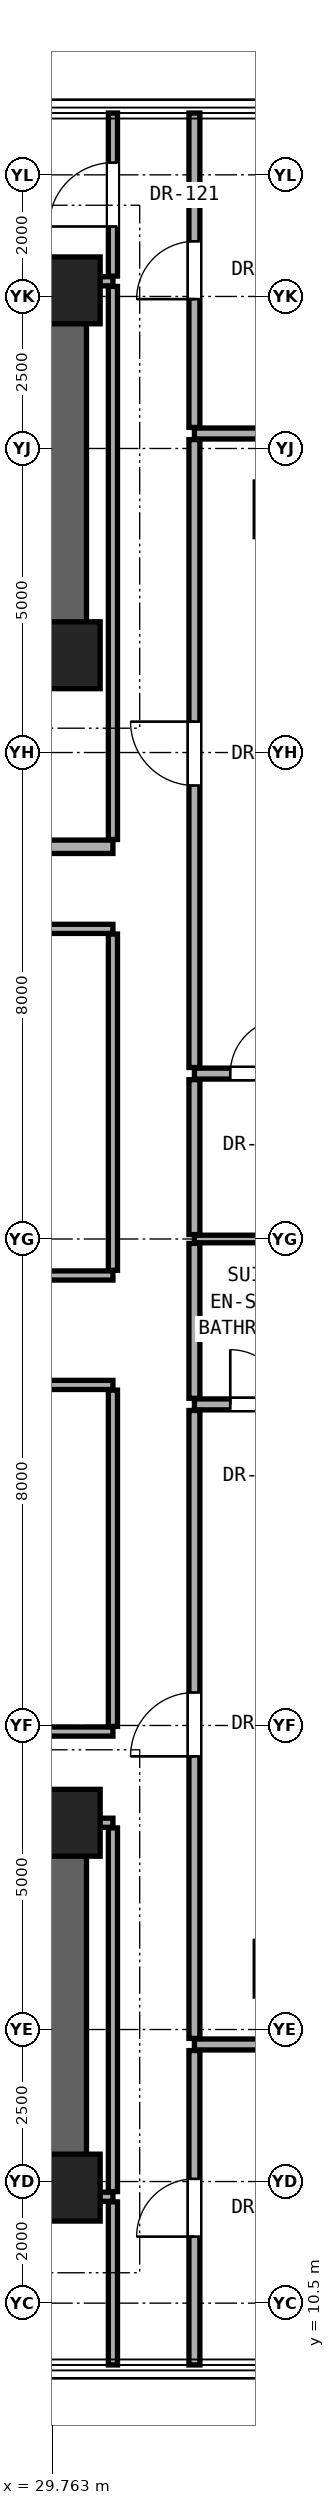
"""IFC4 building model, lengths in metres.
Left out: names, types, materials, properties, quantities, classifications, styles, units other than length and angle.
Written with IfcOpenShell. Run it as: python <this file> out.ifc"""

import sys

from ifc_helpers import new_model, si_unit, direction, frame, frame_2d, origin, origin_2d, place, context, subcontext, project, spatial, rectangle, extrude, element, fill, save


model = new_model("IFC4")
c1 = context("Model", 3, precision=1e-05, world=origin(), true_north=direction((0.0, 1.0)))
c2 = subcontext(c1, "Body", "Model", "MODEL_VIEW")
j1 = project(units=[si_unit("LENGTHUNIT", "METRE"), si_unit("PLANEANGLEUNIT", "RADIAN")], contexts=[c1])
p1 = place(None, origin())
s1 = spatial("IfcSite", under=j1, at=p1, CompositionType="ELEMENT")
p2 = place(p1, origin())
s2 = spatial("IfcBuilding", under=s1, at=p2, CompositionType="ELEMENT")
p3 = place(p2, frame((0.0, 0.0, 124.7)))
s3 = spatial("IfcBuildingStorey", under=s2, at=p3, CompositionType="ELEMENT", Elevation=124.7)
for number, where, z_axis, x_axis in (
    (1, (30.0, 12.4, 0.0), (0.0, 0.0, 1.0), (1.0, 0.0, 0.0)),
    (2, (30.0, 18.4, 0.0), (0.0, 0.0, 1.0), (1.0, 0.0, 0.0)),
    (3, (30.0, 37.6, 0.0), (0.0, 0.0, 1.0), (1.0, 0.0, 0.0)),
    (4, (30.0, 43.6, 0.0), (0.0, 0.0, 1.0), (1.0, 0.0, 0.0)),
):
    element("IfcColumn", number, at=place(p3, frame(where, z_axis=z_axis, x_axis=x_axis)), inside=s3, PredefinedType="COLUMN", context=c2, shape_type="SweptSolid", body=[
        extrude(rectangle(XDim=1.1, YDim=1.1, at=origin_2d()), origin(), (0.0, 0.0, 1.0), 3.3),
    ])
for number, where, z_axis, x_axis in (
    (5, (33.4, 16.0, 0.0), (0.0, 0.0, 1.0), (1.0, 0.0, 0.0)),
    (6, (33.4, 40.0, 0.0), (0.0, 0.0, 1.0), (1.0, 0.0, 0.0)),
):
    element("IfcColumn", number, at=place(p3, frame(where, z_axis=z_axis, x_axis=x_axis)), inside=s3, PredefinedType="PILASTER", context=c2, shape_type="SweptSolid", body=[
        extrude(rectangle(XDim=0.6, YDim=0.9, at=origin_2d()), origin(), (0.0, 0.0, 1.0), 3.3),
    ])
p4 = place(p3, frame((11.0, 43.6, 0.0), z_axis=(0.0, 0.0, 1.0), x_axis=(1.0, 0.0, 0.0)))
e7 = element("IfcWall", 7, at=p4, inside=s3, PredefinedType="SHEAR", context=c2, shape_type="SweptSolid", body=[
    extrude(rectangle(XDim=19.0, YDim=0.65, at=frame_2d((9.5, 0.0))), origin(), (0.0, 0.0, 1.0), 3.08),
])
p5 = place(p3, frame((30.0, 37.6, 0.0), z_axis=(0.0, 0.0, 1.0), x_axis=(0.0, 1.0, 0.0)))
e8 = element("IfcWall", 8, at=p5, inside=s3, PredefinedType="SHEAR", context=c2, shape_type="SweptSolid", body=[
    extrude(rectangle(XDim=6.0, YDim=0.65, at=frame_2d((3.0, 0.0))), origin(), (0.0, 0.0, 1.0), 3.08),
])
p6 = place(p3, frame((11.0, 37.6, 0.0), z_axis=(0.0, 0.0, 1.0), x_axis=(1.0, 0.0, 0.0)))
e9 = element("IfcWall", 9, at=p6, inside=s3, PredefinedType="SHEAR", context=c2, shape_type="SweptSolid", body=[
    extrude(rectangle(XDim=19.0, YDim=0.65, at=frame_2d((9.5, 0.0))), origin(), (0.0, 0.0, 1.0), 3.08),
])
p7 = place(p6, frame((1.06, 0.0, 0.0)))
e10 = element("IfcOpeningElement", 10, at=p7, cuts=e9, PredefinedType="OPENING", context=c2, shape_type="SweptSolid", body=[
    extrude(rectangle(XDim=1.15, YDim=2.2, at=frame_2d((0.575, 1.1))), frame((0.0, 0.335, 0.0), z_axis=(0.0, -1.0, 0.0), x_axis=(1.0, 0.0, 0.0)), (0.0, 0.0, 1.0), 0.67),
])
p8 = place(p6, frame((9.55, 0.0, 0.0)))
e11 = element("IfcOpeningElement", 11, at=p8, cuts=e9, PredefinedType="OPENING", context=c2, shape_type="SweptSolid", body=[
    extrude(rectangle(XDim=1.4, YDim=2.35, at=frame_2d((0.7, 1.175))), frame((0.0, 0.335, 0.0), z_axis=(0.0, -1.0, 0.0), x_axis=(1.0, 0.0, 0.0)), (0.0, 0.0, 1.0), 0.67),
])
p9 = place(p6, frame((11.95, 0.0, 0.0)))
e12 = element("IfcOpeningElement", 12, at=p9, cuts=e9, PredefinedType="OPENING", context=c2, shape_type="SweptSolid", body=[
    extrude(rectangle(XDim=1.4, YDim=2.35, at=frame_2d((0.7, 1.175))), frame((0.0, 0.335, 0.0), z_axis=(0.0, -1.0, 0.0), x_axis=(1.0, 0.0, 0.0)), (0.0, 0.0, 1.0), 0.67),
])
p10 = place(p3, frame((11.0, 12.4, 0.0), z_axis=(0.0, 0.0, 1.0), x_axis=(1.0, 0.0, 0.0)))
e13 = element("IfcWall", 13, at=p10, inside=s3, PredefinedType="SHEAR", context=c2, shape_type="SweptSolid", body=[
    extrude(rectangle(XDim=19.0, YDim=0.65, at=frame_2d((9.5, 0.0))), origin(), (0.0, 0.0, 1.0), 3.08),
])
p11 = place(p3, frame((30.0, 12.4, 0.0), z_axis=(0.0, 0.0, 1.0), x_axis=(0.0, 1.0, 0.0)))
e14 = element("IfcWall", 14, at=p11, inside=s3, PredefinedType="SHEAR", context=c2, shape_type="SweptSolid", body=[
    extrude(rectangle(XDim=6.0, YDim=0.65, at=frame_2d((3.0, 0.0))), origin(), (0.0, 0.0, 1.0), 3.08),
])
p12 = place(p3, frame((11.0, 18.4, 0.0), z_axis=(0.0, 0.0, 1.0), x_axis=(1.0, 0.0, 0.0)))
e15 = element("IfcWall", 15, at=p12, inside=s3, PredefinedType="SHEAR", context=c2, shape_type="SweptSolid", body=[
    extrude(rectangle(XDim=19.0, YDim=0.65, at=frame_2d((9.5, 0.0))), origin(), (0.0, 0.0, 1.0), 3.08),
])
p13 = place(p12, frame((4.175, 0.0, 0.0)))
e16 = element("IfcOpeningElement", 16, at=p13, cuts=e15, PredefinedType="OPENING", context=c2, shape_type="SweptSolid", body=[
    extrude(rectangle(XDim=1.2, YDim=2.25, at=frame_2d((0.6, 1.125))), frame((0.0, 0.335, 0.0), z_axis=(0.0, -1.0, 0.0), x_axis=(1.0, 0.0, 0.0)), (0.0, 0.0, 1.0), 0.67),
])
p14 = place(p12, frame((9.6, 0.0, 0.0)))
e17 = element("IfcOpeningElement", 17, at=p14, cuts=e15, PredefinedType="OPENING", context=c2, shape_type="SweptSolid", body=[
    extrude(rectangle(XDim=1.3, YDim=2.3, at=frame_2d((0.65, 1.15))), frame((0.0, 0.335, 0.0), z_axis=(0.0, -1.0, 0.0), x_axis=(1.0, 0.0, 0.0)), (0.0, 0.0, 1.0), 0.67),
])
p15 = place(p12, frame((11.9, 0.0, 0.0)))
e18 = element("IfcOpeningElement", 18, at=p15, cuts=e15, PredefinedType="OPENING", context=c2, shape_type="SweptSolid", body=[
    extrude(rectangle(XDim=1.3, YDim=2.3, at=frame_2d((0.65, 1.15))), frame((0.0, 0.335, 0.0), z_axis=(0.0, -1.0, 0.0), x_axis=(1.0, 0.0, 0.0)), (0.0, 0.0, 1.0), 0.67),
])
p16 = place(p12, frame((14.3, 0.0, 0.0)))
e19 = element("IfcOpeningElement", 19, at=p16, cuts=e15, PredefinedType="OPENING", context=c2, shape_type="SweptSolid", body=[
    extrude(rectangle(XDim=1.3, YDim=2.3, at=frame_2d((0.65, 1.15))), frame((0.0, 0.335, 0.0), z_axis=(0.0, -1.0, 0.0), x_axis=(1.0, 0.0, 0.0)), (0.0, 0.0, 1.0), 0.67),
])
p17 = place(p12, frame((16.6, 0.0, 0.0)))
e20 = element("IfcOpeningElement", 20, at=p17, cuts=e15, PredefinedType="OPENING", context=c2, shape_type="SweptSolid", body=[
    extrude(rectangle(XDim=1.3, YDim=2.3, at=frame_2d((0.65, 1.15))), frame((0.0, 0.335, 0.0), z_axis=(0.0, -1.0, 0.0), x_axis=(1.0, 0.0, 0.0)), (0.0, 0.0, 1.0), 0.67),
])
p18 = place(p3, frame((30.32, 12.25, 0.0), z_axis=(0.0, 0.0, 1.0), x_axis=(1.0, 0.0, 0.0)))
e21 = element("IfcWall", 21, at=p18, inside=s3, PredefinedType="PARTITIONING", context=c2, shape_type="SweptSolid", body=[
    extrude(rectangle(XDim=0.44, YDim=0.15, at=frame_2d((0.22, 0.0))), origin(), (0.0, 0.0, 1.0), 3.08),
])
p19 = place(p3, frame((32.1, 14.754, 0.0), z_axis=(0.0, 0.0, 1.0), x_axis=(1.0, 0.0, 0.0)))
e22 = element("IfcWall", 22, at=p19, inside=s3, PredefinedType="PARTITIONING", context=c2, shape_type="SweptSolid", body=[
    extrude(rectangle(XDim=3.55, YDim=0.18, at=frame_2d((1.775, 0.0))), origin(), (0.0, 0.0, 1.0), 3.08),
])
p20 = place(p3, frame((30.32, 18.4, 0.0), z_axis=(0.0, 0.0, 1.0), x_axis=(1.0, 0.0, 0.0)))
e23 = element("IfcWall", 23, at=p20, inside=s3, PredefinedType="PARTITIONING", context=c2, shape_type="SweptSolid", body=[
    extrude(rectangle(XDim=0.44, YDim=0.15, at=frame_2d((0.22, 0.0))), origin(), (0.0, 0.0, 1.0), 2.456),
])
p21 = place(p3, frame((21.44, 19.9, 0.0), z_axis=(0.0, 0.0, 1.0), x_axis=(1.0, 0.0, 0.0)))
e24 = element("IfcWall", 24, at=p21, inside=s3, PredefinedType="PARTITIONING", context=c2, shape_type="SweptSolid", body=[
    extrude(rectangle(XDim=9.32, YDim=0.15, at=frame_2d((4.66, 0.0))), origin(), (0.0, 0.0, 1.0), 2.216),
])
p22 = place(p21, frame((4.185, 0.0, 0.0)))
e25 = element("IfcOpeningElement", 25, at=p22, cuts=e24, PredefinedType="OPENING", context=c2, shape_type="SweptSolid", body=[
    extrude(rectangle(XDim=0.95, YDim=2.15, at=frame_2d((0.475, 1.075))), frame((0.0, 0.085, 0.0), z_axis=(0.0, -1.0, 0.0), x_axis=(1.0, 0.0, 0.0)), (0.0, 0.0, 1.0), 0.17),
])
p23 = place(p3, frame((32.1, 25.28, 0.0), z_axis=(0.0, 0.0, 1.0), x_axis=(1.0, 0.0, 0.0)))
e26 = element("IfcWall", 26, at=p23, inside=s3, PredefinedType="PARTITIONING", context=c2, shape_type="SweptSolid", body=[
    extrude(rectangle(XDim=8.84, YDim=0.18, at=frame_2d((4.42, 0.0))), origin(), (0.0, 0.0, 1.0), 2.299),
])
p24 = place(p23, frame((4.945, 0.0, 0.0)))
e27 = element("IfcOpeningElement", 27, at=p24, cuts=e26, PredefinedType="OPENING", context=c2, shape_type="SweptSolid", body=[
    extrude(rectangle(XDim=0.95, YDim=2.15, at=frame_2d((0.475, 1.075))), frame((0.0, 0.1, 0.0), z_axis=(0.0, -1.0, 0.0), x_axis=(1.0, 0.0, 0.0)), (0.0, 0.0, 1.0), 0.2),
])
p25 = place(p23, frame((0.59, 0.0, 0.0)))
e28 = element("IfcOpeningElement", 28, at=p25, cuts=e26, PredefinedType="OPENING", context=c2, shape_type="SweptSolid", body=[
    extrude(rectangle(XDim=0.9, YDim=2.1, at=frame_2d((0.45, 1.05))), frame((0.0, 0.1, 0.0), z_axis=(0.0, -1.0, 0.0), x_axis=(1.0, 0.0, 0.0)), (0.0, 0.0, 1.0), 0.2),
])
for number, where, z_axis, x_axis in (
    (29, (21.4, 25.6, 0.0), (0.0, 0.0, 1.0), (1.0, 0.0, 0.0)),
    (30, (21.4, 27.4, 0.0), (0.0, 0.0, 1.0), (1.0, 0.0, 0.0)),
):
    element("IfcWall", number, at=place(p3, frame(where, z_axis=z_axis, x_axis=x_axis)), inside=s3, PredefinedType="PARTITIONING", context=c2, shape_type="SweptSolid", body=[
        extrude(rectangle(XDim=9.36, YDim=0.15, at=frame_2d((4.68, 0.0))), origin(), (0.0, 0.0, 1.0), 2.216),
    ])
p26 = place(p3, frame((32.1, 28.0, 0.0), z_axis=(0.0, 0.0, 1.0), x_axis=(1.0, 0.0, 0.0)))
e31 = element("IfcWall", 31, at=p26, inside=s3, PredefinedType="PARTITIONING", context=c2, shape_type="SweptSolid", body=[
    extrude(rectangle(XDim=8.84, YDim=0.125, at=frame_2d((4.42, 0.0))), origin(), (0.0, 0.0, 1.0), 2.299),
])
p27 = place(p3, frame((32.1, 30.72, 0.0), z_axis=(0.0, 0.0, 1.0), x_axis=(1.0, 0.0, 0.0)))
e32 = element("IfcWall", 32, at=p27, inside=s3, PredefinedType="PARTITIONING", context=c2, shape_type="SweptSolid", body=[
    extrude(rectangle(XDim=8.84, YDim=0.18, at=frame_2d((4.42, 0.0))), origin(), (0.0, 0.0, 1.0), 2.299),
])
p28 = place(p27, frame((4.945, 0.0, 0.0)))
e33 = element("IfcOpeningElement", 33, at=p28, cuts=e32, PredefinedType="OPENING", context=c2, shape_type="SweptSolid", body=[
    extrude(rectangle(XDim=0.95, YDim=2.15, at=frame_2d((0.475, 1.075))), frame((0.0, 0.1, 0.0), z_axis=(0.0, -1.0, 0.0), x_axis=(1.0, 0.0, 0.0)), (0.0, 0.0, 1.0), 0.2),
])
p29 = place(p27, frame((0.59, 0.0, 0.0)))
e34 = element("IfcOpeningElement", 34, at=p29, cuts=e32, PredefinedType="OPENING", context=c2, shape_type="SweptSolid", body=[
    extrude(rectangle(XDim=0.9, YDim=2.1, at=frame_2d((0.45, 1.05))), frame((0.0, 0.1, 0.0), z_axis=(0.0, -1.0, 0.0), x_axis=(1.0, 0.0, 0.0)), (0.0, 0.0, 1.0), 0.2),
])
p30 = place(p3, frame((21.44, 33.1, 0.0), z_axis=(0.0, 0.0, 1.0), x_axis=(1.0, 0.0, 0.0)))
e35 = element("IfcWall", 35, at=p30, inside=s3, PredefinedType="PARTITIONING", context=c2, shape_type="SweptSolid", body=[
    extrude(rectangle(XDim=9.32, YDim=0.15, at=frame_2d((4.66, 0.0))), origin(), (0.0, 0.0, 1.0), 2.216),
])
p31 = place(p30, frame((4.185, 0.0, 0.0)))
e36 = element("IfcOpeningElement", 36, at=p31, cuts=e35, PredefinedType="OPENING", context=c2, shape_type="SweptSolid", body=[
    extrude(rectangle(XDim=0.95, YDim=2.15, at=frame_2d((0.475, 1.075))), frame((0.0, 0.085, 0.0), z_axis=(0.0, -1.0, 0.0), x_axis=(1.0, 0.0, 0.0)), (0.0, 0.0, 1.0), 0.17),
])
p32 = place(p3, frame((15.59, 34.45, 0.0), z_axis=(0.0, 0.0, 1.0), x_axis=(1.0, 0.0, 0.0)))
e37 = element("IfcWall", 37, at=p32, inside=s3, PredefinedType="SOLIDWALL", context=c2, shape_type="SweptSolid", body=[
    extrude(rectangle(XDim=15.17, YDim=0.22, at=frame_2d((7.585, 0.0))), origin(), (0.0, 0.0, 1.0), 2.216),
])
p33 = place(p32, frame((6.435, 0.0, 0.0)))
e38 = element("IfcOpeningElement", 38, at=p33, cuts=e37, PredefinedType="OPENING", context=c2, shape_type="SweptSolid", body=[
    extrude(rectangle(XDim=0.85, YDim=2.01, at=frame_2d((0.425, 1.005))), frame((0.0, 0.12, 0.0), z_axis=(0.0, -1.0, 0.0), x_axis=(1.0, 0.0, 0.0)), (0.0, 0.0, 1.0), 0.24),
])
p34 = place(p32, frame((9.96, 0.0, 0.0)))
e39 = element("IfcOpeningElement", 39, at=p34, cuts=e37, PredefinedType="OPENING", context=c2, shape_type="SweptSolid", body=[
    extrude(rectangle(XDim=0.95, YDim=2.15, at=frame_2d((0.475, 1.075))), frame((0.0, 0.12, 0.0), z_axis=(0.0, -1.0, 0.0), x_axis=(1.0, 0.0, 0.0)), (0.0, 0.0, 1.0), 0.24),
])
p35 = place(p32, frame((12.21, 0.0, 0.0)))
e40 = element("IfcOpeningElement", 40, at=p35, cuts=e37, PredefinedType="OPENING", context=c2, shape_type="SweptSolid", body=[
    extrude(rectangle(XDim=0.95, YDim=2.15, at=frame_2d((0.475, 1.075))), frame((0.0, 0.12, 0.0), z_axis=(0.0, -1.0, 0.0), x_axis=(1.0, 0.0, 0.0)), (0.0, 0.0, 1.0), 0.24),
])
p36 = place(p32, frame((0.675, 0.0, 0.0)))
e41 = element("IfcOpeningElement", 41, at=p36, cuts=e37, PredefinedType="OPENING", context=c2, shape_type="SweptSolid", body=[
    extrude(rectangle(XDim=0.85, YDim=2.01, at=frame_2d((0.425, 1.005))), frame((0.0, 0.12, 0.0), z_axis=(0.0, -1.0, 0.0), x_axis=(1.0, 0.0, 0.0)), (0.0, 0.0, 1.0), 0.24),
])
p37 = place(p32, frame((2.835, 0.0, 0.0)))
e42 = element("IfcOpeningElement", 42, at=p37, cuts=e37, PredefinedType="OPENING", context=c2, shape_type="SweptSolid", body=[
    extrude(rectangle(XDim=0.85, YDim=2.01, at=frame_2d((0.425, 1.005))), frame((0.0, 0.12, 0.0), z_axis=(0.0, -1.0, 0.0), x_axis=(1.0, 0.0, 0.0)), (0.0, 0.0, 1.0), 0.24),
])
p38 = place(p3, frame((32.1, 41.246, 0.0), z_axis=(0.0, 0.0, 1.0), x_axis=(1.0, 0.0, 0.0)))
e43 = element("IfcWall", 43, at=p38, inside=s3, PredefinedType="PARTITIONING", context=c2, shape_type="SweptSolid", body=[
    extrude(rectangle(XDim=3.55, YDim=0.18, at=frame_2d((1.775, 0.0))), origin(), (0.0, 0.0, 1.0), 3.08),
])
p39 = place(p3, frame((30.32, 43.75, 0.0), z_axis=(0.0, 0.0, 1.0), x_axis=(1.0, 0.0, 0.0)))
e44 = element("IfcWall", 44, at=p39, inside=s3, PredefinedType="PARTITIONING", context=c2, shape_type="SweptSolid", body=[
    extrude(rectangle(XDim=0.44, YDim=0.15, at=frame_2d((0.22, 0.0))), origin(), (0.0, 0.0, 1.0), 3.08),
])
p40 = place(p3, frame((30.76, 9.484, 0.0), z_axis=(0.0, 0.0, 1.0), x_axis=(0.0, 1.0, 0.0)))
e45 = element("IfcWall", 45, at=p40, inside=s3, PredefinedType="PARTITIONING", context=c2, shape_type="SweptSolid", body=[
    extrude(rectangle(XDim=2.681, YDim=0.15, at=frame_2d((1.341, 0.0))), origin(), (0.0, 0.0, 1.0), 3.08),
])
p41 = place(p3, frame((30.76, 12.335, 0.0), z_axis=(0.0, 0.0, 1.0), x_axis=(0.0, 1.0, 0.0)))
e46 = element("IfcWall", 46, at=p41, inside=s3, PredefinedType="PARTITIONING", context=c2, shape_type="SweptSolid", body=[
    extrude(rectangle(XDim=5.98, YDim=0.15, at=frame_2d((2.99, 0.0))), origin(), (0.0, 0.0, 1.0), 2.456),
])
for number, where, z_axis, x_axis in (
    (47, (30.76, 19.985, 0.0), (0.0, 0.0, 1.0), (0.0, 1.0, 0.0)),
    (48, (30.76, 27.485, 0.0), (0.0, 0.0, 1.0), (0.0, 1.0, 0.0)),
):
    element("IfcWall", number, at=place(p3, frame(where, z_axis=z_axis, x_axis=x_axis)), inside=s3, PredefinedType="PARTITIONING", context=c2, shape_type="SweptSolid", body=[
        extrude(rectangle(XDim=5.53, YDim=0.15, at=frame_2d((2.765, 0.0))), origin(), (0.0, 0.0, 1.0), 2.299),
    ])
p42 = place(p3, frame((30.76, 34.57, 0.0), z_axis=(0.0, 0.0, 1.0), x_axis=(0.0, 1.0, 0.0)))
e49 = element("IfcWall", 49, at=p42, inside=s3, PredefinedType="PARTITIONING", context=c2, shape_type="SweptSolid", body=[
    extrude(rectangle(XDim=9.095, YDim=0.15, at=frame_2d((4.547, 0.0))), origin(), (0.0, 0.0, 1.0), 2.456),
])
p43 = place(p3, frame((30.76, 43.835, 0.0), z_axis=(0.0, 0.0, 1.0), x_axis=(0.0, 1.0, 0.0)))
e50 = element("IfcWall", 50, at=p43, inside=s3, PredefinedType="PARTITIONING", context=c2, shape_type="SweptSolid", body=[
    extrude(rectangle(XDim=2.681, YDim=0.15, at=frame_2d((1.341, 0.0))), origin(), (0.0, 0.0, 1.0), 3.08),
])
p44 = place(p43, frame((0.815, 0.0, 0.0)))
e51 = element("IfcOpeningElement", 51, at=p44, cuts=e50, PredefinedType="OPENING", context=c2, shape_type="SweptSolid", body=[
    extrude(rectangle(XDim=1.05, YDim=2.2, at=frame_2d((0.525, 1.1))), frame((0.0, 0.085, 0.0), z_axis=(0.0, -1.0, 0.0), x_axis=(1.0, 0.0, 0.0)), (0.0, 0.0, 1.0), 0.17),
])
p45 = place(p3, frame((32.1, 9.484, 0.0), z_axis=(0.0, 0.0, 1.0), x_axis=(0.0, 1.0, 0.0)))
e52 = element("IfcWall", 52, at=p45, inside=s3, PredefinedType="PARTITIONING", context=c2, shape_type="SweptSolid", body=[
    extrude(rectangle(XDim=5.17, YDim=0.18, at=frame_2d((2.585, 0.0))), origin(), (0.0, 0.0, 1.0), 3.08),
])
p46 = place(p45, frame((2.11, 0.0, 0.0)))
e53 = element("IfcOpeningElement", 53, at=p46, cuts=e52, PredefinedType="OPENING", context=c2, shape_type="SweptSolid", body=[
    extrude(rectangle(XDim=0.95, YDim=2.15, at=frame_2d((0.475, 1.075))), frame((0.0, 0.1, 0.0), z_axis=(0.0, -1.0, 0.0), x_axis=(1.0, 0.0, 0.0)), (0.0, 0.0, 1.0), 0.2),
])
p47 = place(p3, frame((32.1, 14.854, 0.0), z_axis=(0.0, 0.0, 1.0), x_axis=(0.0, 1.0, 0.0)))
e54 = element("IfcWall", 54, at=p47, inside=s3, PredefinedType="PARTITIONING", context=c2, shape_type="SweptSolid", body=[
    extrude(rectangle(XDim=10.326, YDim=0.18, at=frame_2d((5.163, 0.0))), origin(), (0.0, 0.0, 1.0), 2.299),
])
p48 = place(p47, frame((4.638, 0.0, 0.0)))
e55 = element("IfcOpeningElement", 55, at=p48, cuts=e54, PredefinedType="OPENING", context=c2, shape_type="SweptSolid", body=[
    extrude(rectangle(XDim=1.05, YDim=2.2, at=frame_2d((0.525, 1.1))), frame((0.0, 0.1, 0.0), z_axis=(0.0, -1.0, 0.0), x_axis=(1.0, 0.0, 0.0)), (0.0, 0.0, 1.0), 0.2),
])
for number, where, z_axis, x_axis in (
    (56, (32.1, 25.38, 0.0), (0.0, 0.0, 1.0), (0.0, 1.0, 0.0)),
    (57, (32.1, 28.073, 0.0), (0.0, 0.0, 1.0), (0.0, 1.0, 0.0)),
):
    element("IfcWall", number, at=place(p3, frame(where, z_axis=z_axis, x_axis=x_axis)), inside=s3, PredefinedType="PARTITIONING", context=c2, shape_type="SweptSolid", body=[
        extrude(rectangle(XDim=2.548, YDim=0.18, at=frame_2d((1.274, 0.0))), origin(), (0.0, 0.0, 1.0), 3.08),
    ])
p49 = place(p3, frame((32.1, 30.82, 0.0), z_axis=(0.0, 0.0, 1.0), x_axis=(0.0, 1.0, 0.0)))
e58 = element("IfcWall", 58, at=p49, inside=s3, PredefinedType="PARTITIONING", context=c2, shape_type="SweptSolid", body=[
    extrude(rectangle(XDim=10.326, YDim=0.18, at=frame_2d((5.163, 0.0))), origin(), (0.0, 0.0, 1.0), 2.299),
])
p50 = place(p49, frame((4.638, 0.0, 0.0)))
e59 = element("IfcOpeningElement", 59, at=p50, cuts=e58, PredefinedType="OPENING", context=c2, shape_type="SweptSolid", body=[
    extrude(rectangle(XDim=1.05, YDim=2.2, at=frame_2d((0.525, 1.1))), frame((0.0, 0.1, 0.0), z_axis=(0.0, -1.0, 0.0), x_axis=(1.0, 0.0, 0.0)), (0.0, 0.0, 1.0), 0.2),
])
p51 = place(p3, frame((32.1, 41.346, 0.0), z_axis=(0.0, 0.0, 1.0), x_axis=(0.0, 1.0, 0.0)))
e60 = element("IfcWall", 60, at=p51, inside=s3, PredefinedType="PARTITIONING", context=c2, shape_type="SweptSolid", body=[
    extrude(rectangle(XDim=5.17, YDim=0.18, at=frame_2d((2.585, 0.0))), origin(), (0.0, 0.0, 1.0), 3.08),
])
p52 = place(p51, frame((2.11, 0.0, 0.0)))
e61 = element("IfcOpeningElement", 61, at=p52, cuts=e60, PredefinedType="OPENING", context=c2, shape_type="SweptSolid", body=[
    extrude(rectangle(XDim=0.95, YDim=2.15, at=frame_2d((0.475, 1.075))), frame((0.0, 0.1, 0.0), z_axis=(0.0, -1.0, 0.0), x_axis=(1.0, 0.0, 0.0)), (0.0, 0.0, 1.0), 0.2),
])
p53 = place(p48, origin())
e62 = element("IfcDoor", 62, at=p53, inside=s3, OperationType="SINGLE_SWING_LEFT", PredefinedType="DOOR", context=c2, shape_type="SweptSolid", body=[
    extrude(rectangle(XDim=1.05, YDim=2.2, at=frame_2d((0.525, 1.1))), frame((0.0, 0.025, 0.0), z_axis=(0.0, -1.0, 0.0), x_axis=(1.0, 0.0, 0.0)), (0.0, 0.0, 1.0), 0.05),
])
fill(e55, e62)
p54 = place(p25, origin())
e63 = element("IfcDoor", 63, at=p54, inside=s3, OperationType="SINGLE_SWING_LEFT", PredefinedType="DOOR", context=c2, shape_type="SweptSolid", body=[
    extrude(rectangle(XDim=0.9, YDim=2.1, at=frame_2d((0.45, 1.05))), frame((0.0, 0.025, 0.0), z_axis=(0.0, -1.0, 0.0), x_axis=(1.0, 0.0, 0.0)), (0.0, 0.0, 1.0), 0.05),
])
fill(e28, e63)
p55 = place(p50, origin())
e64 = element("IfcDoor", 64, at=p55, inside=s3, OperationType="SINGLE_SWING_RIGHT", PredefinedType="DOOR", context=c2, shape_type="SweptSolid", body=[
    extrude(rectangle(XDim=1.05, YDim=2.2, at=frame_2d((0.525, 1.1))), frame((0.0, 0.025, 0.0), z_axis=(0.0, -1.0, 0.0), x_axis=(1.0, 0.0, 0.0)), (0.0, 0.0, 1.0), 0.05),
])
fill(e59, e64)
p56 = place(p29, origin())
e65 = element("IfcDoor", 65, at=p56, inside=s3, OperationType="SINGLE_SWING_RIGHT", PredefinedType="DOOR", context=c2, shape_type="SweptSolid", body=[
    extrude(rectangle(XDim=0.9, YDim=2.1, at=frame_2d((0.45, 1.05))), frame((0.0, 0.025, 0.0), z_axis=(0.0, -1.0, 0.0), x_axis=(1.0, 0.0, 0.0)), (0.0, 0.0, 1.0), 0.05),
])
fill(e34, e65)
p57 = place(p46, origin())
e66 = element("IfcDoor", 66, at=p57, inside=s3, OperationType="SINGLE_SWING_LEFT", PredefinedType="DOOR", context=c2, shape_type="SweptSolid", body=[
    extrude(rectangle(XDim=0.95, YDim=2.15, at=frame_2d((0.475, 1.075))), frame((0.0, 0.025, 0.0), z_axis=(0.0, -1.0, 0.0), x_axis=(1.0, 0.0, 0.0)), (0.0, 0.0, 1.0), 0.05),
])
fill(e53, e66)
p58 = place(p44, origin())
e67 = element("IfcDoor", 67, at=p58, inside=s3, OperationType="SINGLE_SWING_LEFT", PredefinedType="DOOR", context=c2, shape_type="SweptSolid", body=[
    extrude(rectangle(XDim=1.05, YDim=2.2, at=frame_2d((0.525, 1.1))), frame((0.0, 0.025, 0.0), z_axis=(0.0, -1.0, 0.0), x_axis=(1.0, 0.0, 0.0)), (0.0, 0.0, 1.0), 0.05),
])
fill(e51, e67)
p59 = place(p52, origin())
e68 = element("IfcDoor", 68, at=p59, inside=s3, OperationType="SINGLE_SWING_LEFT", PredefinedType="DOOR", context=c2, shape_type="SweptSolid", body=[
    extrude(rectangle(XDim=0.95, YDim=2.15, at=frame_2d((0.475, 1.075))), frame((0.0, 0.025, 0.0), z_axis=(0.0, -1.0, 0.0), x_axis=(1.0, 0.0, 0.0)), (0.0, 0.0, 1.0), 0.05),
])
fill(e61, e68)
save(model, sys.argv[1])
